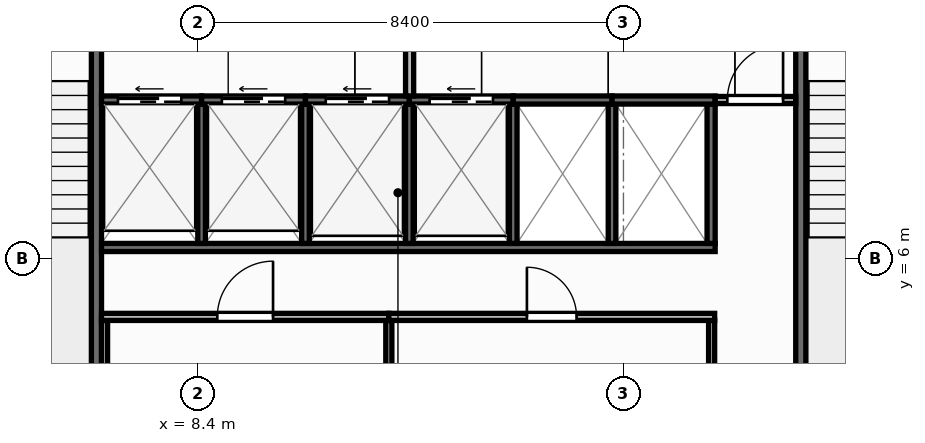
"""IFC4 building model, lengths in metres.
Left out: names, types, materials, properties, quantities, classifications, styles, units other than length and angle.
Written with IfcOpenShell. Run it as: python <this file> out.ifc"""

import sys

from ifc_helpers import new_model, si_unit, direction, frame, frame_2d, origin, place, context, subcontext, project, spatial, rectangle, extrude, element, fill, save


model = new_model("IFC4")
c1 = context("Model", 3, precision=1e-05, world=origin(), true_north=direction((0.0, 1.0)))
c2 = subcontext(c1, "Body", "Model", "MODEL_VIEW")
j1 = project(units=[si_unit("LENGTHUNIT", "METRE"), si_unit("PLANEANGLEUNIT", "RADIAN")], contexts=[c1])
p1 = place(None, origin())
s1 = spatial("IfcSite", under=j1, at=p1, CompositionType="ELEMENT")
p2 = place(p1, origin())
s2 = spatial("IfcBuilding", under=s1, at=p2, CompositionType="ELEMENT")
p3 = place(p2, frame((0.0, 0.0, -4.5)))
s3 = spatial("IfcBuildingStorey", under=s2, at=p3, CompositionType="ELEMENT", Elevation=-4.5)
for number, where, z_axis, x_axis in (
    (1, (6.4, 3.5, 0.0), (0.0, 0.0, 1.0), (0.0, 1.0, 0.0)),
    (2, (20.3, 3.5, 0.0), (0.0, 0.0, 1.0), (0.0, 1.0, 0.0)),
):
    element("IfcWall", number, at=place(p3, frame(where, z_axis=z_axis, x_axis=x_axis)), inside=s3, PredefinedType="SHEAR", context=c2, shape_type="SweptSolid", body=[
        extrude(rectangle(XDim=7.6, YDim=0.2, at=frame_2d((3.8, 0.0))), origin(), (0.0, 0.0, 1.0), 4.25),
    ])
p4 = place(p3, frame((6.5, 6.22, 0.0), z_axis=(0.0, 0.0, 1.0), x_axis=(1.0, 0.0, 0.0)))
e3 = element("IfcWall", 3, at=p4, inside=s3, PredefinedType="SHEAR", context=c2, shape_type="SweptSolid", body=[
    extrude(rectangle(XDim=12.11, YDim=0.16, at=frame_2d((6.055, 0.0))), origin(), (0.0, 0.0, 1.0), 4.25),
])
p5 = place(p3, frame((18.53, 6.3, 0.0), z_axis=(0.0, 0.0, 1.0), x_axis=(0.0, 1.0, 0.0)))
e4 = element("IfcWall", 4, at=p5, inside=s3, PredefinedType="SHEAR", context=c2, shape_type="SweptSolid", body=[
    extrude(rectangle(XDim=2.75, YDim=0.16, at=frame_2d((1.375, 0.0))), origin(), (0.0, 0.0, 1.0), 4.25),
])
for number, where, z_axis, x_axis in (
    (5, (8.475, 6.3, 0.0), (0.0, 0.0, 1.0), (0.0, 1.0, 0.0)),
    (6, (10.525, 6.3, 0.0), (0.0, 0.0, 1.0), (0.0, 1.0, 0.0)),
    (7, (12.575, 6.3, 0.0), (0.0, 0.0, 1.0), (0.0, 1.0, 0.0)),
    (8, (14.625, 6.3, 0.0), (0.0, 0.0, 1.0), (0.0, 1.0, 0.0)),
    (9, (16.575, 6.3, 0.0), (0.0, 0.0, 1.0), (0.0, 1.0, 0.0)),
):
    element("IfcWall", number, at=place(p3, frame(where, z_axis=z_axis, x_axis=x_axis)), inside=s3, PredefinedType="SHEAR", context=c2, shape_type="SweptSolid", body=[
        extrude(rectangle(XDim=2.75, YDim=0.15, at=frame_2d((1.375, 0.0))), origin(), (0.0, 0.0, 1.0), 4.25),
    ])
p6 = place(p3, frame((6.5, 9.13, 0.0), z_axis=(0.0, 0.0, 1.0), x_axis=(1.0, 0.0, 0.0)))
e10 = element("IfcWall", 10, at=p6, inside=s3, PredefinedType="SHEAR", context=c2, shape_type="SweptSolid", body=[
    extrude(rectangle(XDim=1.975, YDim=0.16, at=frame_2d((0.988, 0.0))), origin(), (0.0, 0.0, 1.0), 4.25),
])
p7 = place(p6, frame((0.325, 0.0, 0.0)))
e11 = element("IfcOpeningElement", 11, at=p7, cuts=e10, PredefinedType="OPENING", context=c2, shape_type="SweptSolid", body=[
    extrude(rectangle(XDim=1.25, YDim=2.15, at=frame_2d((0.625, 1.075))), frame((0.0, 0.09, 0.0), z_axis=(0.0, -1.0, 0.0), x_axis=(1.0, 0.0, 0.0)), (0.0, 0.0, 1.0), 0.18),
])
p8 = place(p3, frame((8.475, 9.13, 0.0), z_axis=(0.0, 0.0, 1.0), x_axis=(1.0, 0.0, 0.0)))
e12 = element("IfcWall", 12, at=p8, inside=s3, PredefinedType="SHEAR", context=c2, shape_type="SweptSolid", body=[
    extrude(rectangle(XDim=2.05, YDim=0.16, at=frame_2d((1.025, 0.0))), origin(), (0.0, 0.0, 1.0), 4.25),
])
p9 = place(p8, frame((0.4, 0.0, 0.0)))
e13 = element("IfcOpeningElement", 13, at=p9, cuts=e12, PredefinedType="OPENING", context=c2, shape_type="SweptSolid", body=[
    extrude(rectangle(XDim=1.25, YDim=2.15, at=frame_2d((0.625, 1.075))), frame((0.0, 0.09, 0.0), z_axis=(0.0, -1.0, 0.0), x_axis=(1.0, 0.0, 0.0)), (0.0, 0.0, 1.0), 0.18),
])
p10 = place(p3, frame((10.525, 9.13, 0.0), z_axis=(0.0, 0.0, 1.0), x_axis=(1.0, 0.0, 0.0)))
e14 = element("IfcWall", 14, at=p10, inside=s3, PredefinedType="SHEAR", context=c2, shape_type="SweptSolid", body=[
    extrude(rectangle(XDim=2.05, YDim=0.16, at=frame_2d((1.025, 0.0))), origin(), (0.0, 0.0, 1.0), 4.25),
])
p11 = place(p10, frame((0.4, 0.0, 0.0)))
e15 = element("IfcOpeningElement", 15, at=p11, cuts=e14, PredefinedType="OPENING", context=c2, shape_type="SweptSolid", body=[
    extrude(rectangle(XDim=1.25, YDim=2.15, at=frame_2d((0.625, 1.075))), frame((0.0, 0.09, 0.0), z_axis=(0.0, -1.0, 0.0), x_axis=(1.0, 0.0, 0.0)), (0.0, 0.0, 1.0), 0.18),
])
p12 = place(p3, frame((12.575, 9.13, 0.0), z_axis=(0.0, 0.0, 1.0), x_axis=(1.0, 0.0, 0.0)))
e16 = element("IfcWall", 16, at=p12, inside=s3, PredefinedType="SHEAR", context=c2, shape_type="SweptSolid", body=[
    extrude(rectangle(XDim=2.05, YDim=0.16, at=frame_2d((1.025, 0.0))), origin(), (0.0, 0.0, 1.0), 4.25),
])
p13 = place(p12, frame((0.4, 0.0, 0.0)))
e17 = element("IfcOpeningElement", 17, at=p13, cuts=e16, PredefinedType="OPENING", context=c2, shape_type="SweptSolid", body=[
    extrude(rectangle(XDim=1.25, YDim=2.15, at=frame_2d((0.625, 1.075))), frame((0.0, 0.09, 0.0), z_axis=(0.0, -1.0, 0.0), x_axis=(1.0, 0.0, 0.0)), (0.0, 0.0, 1.0), 0.18),
])
p14 = place(p3, frame((14.625, 9.13, 0.0), z_axis=(0.0, 0.0, 1.0), x_axis=(1.0, 0.0, 0.0)))
e18 = element("IfcWall", 18, at=p14, inside=s3, PredefinedType="SHEAR", context=c2, shape_type="SweptSolid", body=[
    extrude(rectangle(XDim=1.95, YDim=0.16, at=frame_2d((0.975, 0.0))), origin(), (0.0, 0.0, 1.0), 4.25),
])
p15 = place(p3, frame((16.575, 9.13, 0.0), z_axis=(0.0, 0.0, 1.0), x_axis=(1.0, 0.0, 0.0)))
e19 = element("IfcWall", 19, at=p15, inside=s3, PredefinedType="SHEAR", context=c2, shape_type="SweptSolid", body=[
    extrude(rectangle(XDim=2.035, YDim=0.16, at=frame_2d((1.018, 0.0))), origin(), (0.0, 0.0, 1.0), 4.25),
])
for number, where, z_axis, x_axis in (
    (20, (6.56, 3.52, 0.0), (0.0, 0.0, 1.0), (0.0, 1.0, 0.0)),
    (21, (12.17, 3.52, 0.0), (0.0, 0.0, 1.0), (0.0, 1.0, 0.0)),
    (22, (18.54, 3.52, 0.0), (0.0, 0.0, 1.0), (0.0, 1.0, 0.0)),
):
    element("IfcWall", number, at=place(p3, frame(where, z_axis=z_axis, x_axis=x_axis)), inside=s3, PredefinedType="PARTITIONING", context=c2, shape_type="SweptSolid", body=[
        extrude(rectangle(XDim=1.26, YDim=0.12, at=frame_2d((0.63, 0.0))), origin(), (0.0, 0.0, 1.0), 4.25),
    ])
p16 = place(p3, frame((6.5, 4.85, 0.0), z_axis=(0.0, 0.0, 1.0), x_axis=(1.0, 0.0, 0.0)))
e23 = element("IfcWall", 23, at=p16, inside=s3, PredefinedType="PARTITIONING", context=c2, shape_type="SweptSolid", body=[
    extrude(rectangle(XDim=5.67, YDim=0.14, at=frame_2d((2.835, 0.0))), origin(), (0.0, 0.0, 1.0), 4.25),
])
p17 = place(p16, frame((2.285, 0.0, 0.0)))
e24 = element("IfcOpeningElement", 24, at=p17, cuts=e23, PredefinedType="OPENING", context=c2, shape_type="SweptSolid", body=[
    extrude(rectangle(XDim=1.1, YDim=2.1, at=frame_2d((0.55, 1.05))), frame((0.0, 0.08, 0.0), z_axis=(0.0, -1.0, 0.0), x_axis=(1.0, 0.0, 0.0)), (0.0, 0.0, 1.0), 0.16),
])
p18 = place(p3, frame((12.17, 4.85, 0.0), z_axis=(0.0, 0.0, 1.0), x_axis=(1.0, 0.0, 0.0)))
e25 = element("IfcWall", 25, at=p18, inside=s3, PredefinedType="PARTITIONING", context=c2, shape_type="SweptSolid", body=[
    extrude(rectangle(XDim=6.43, YDim=0.14, at=frame_2d((3.215, 0.0))), origin(), (0.0, 0.0, 1.0), 4.25),
])
p19 = place(p18, frame((2.725, 0.0, 0.0)))
e26 = element("IfcOpeningElement", 26, at=p19, cuts=e25, PredefinedType="OPENING", context=c2, shape_type="SweptSolid", body=[
    extrude(rectangle(XDim=0.98, YDim=2.1, at=frame_2d((0.49, 1.05))), frame((0.0, 0.08, 0.0), z_axis=(0.0, -1.0, 0.0), x_axis=(1.0, 0.0, 0.0)), (0.0, 0.0, 1.0), 0.16),
])
p20 = place(p3, frame((18.61, 9.13, 0.0), z_axis=(0.0, 0.0, 1.0), x_axis=(1.0, 0.0, 0.0)))
e27 = element("IfcWall", 27, at=p20, inside=s3, PredefinedType="PARTITIONING", context=c2, shape_type="SweptSolid", body=[
    extrude(rectangle(XDim=1.59, YDim=0.14, at=frame_2d((0.795, 0.0))), origin(), (0.0, 0.0, 1.0), 4.25),
])
p21 = place(p20, frame((0.24, 0.0, 0.0)))
e28 = element("IfcOpeningElement", 28, at=p21, cuts=e27, PredefinedType="OPENING", context=c2, shape_type="SweptSolid", body=[
    extrude(rectangle(XDim=1.1, YDim=2.1, at=frame_2d((0.55, 1.05))), frame((0.0, 0.08, 0.0), z_axis=(0.0, -1.0, 0.0), x_axis=(1.0, 0.0, 0.0)), (0.0, 0.0, 1.0), 0.16),
])
p22 = place(p3, frame((12.58, 9.21, 0.0), z_axis=(0.0, 0.0, 1.0), x_axis=(0.0, 1.0, 0.0)))
e29 = element("IfcWall", 29, at=p22, inside=s3, PredefinedType="PARTITIONING", context=c2, shape_type="SweptSolid", body=[
    extrude(rectangle(XDim=2.79, YDim=0.16, at=frame_2d((1.395, 0.0))), origin(), (0.0, 0.0, 1.0), 4.25),
])
p23 = place(p7, origin())
e30 = element("IfcDoor", 30, at=p23, inside=s3, OperationType="SLIDING_TO_LEFT", PredefinedType="DOOR", context=c2, shape_type="SweptSolid", body=[
    extrude(rectangle(XDim=1.25, YDim=2.15, at=frame_2d((0.625, 1.075))), frame((0.0, 0.025, 0.0), z_axis=(0.0, -1.0, 0.0), x_axis=(1.0, 0.0, 0.0)), (0.0, 0.0, 1.0), 0.05),
])
fill(e11, e30)
p24 = place(p9, origin())
e31 = element("IfcDoor", 31, at=p24, inside=s3, OperationType="SLIDING_TO_LEFT", PredefinedType="DOOR", context=c2, shape_type="SweptSolid", body=[
    extrude(rectangle(XDim=1.25, YDim=2.15, at=frame_2d((0.625, 1.075))), frame((0.0, 0.025, 0.0), z_axis=(0.0, -1.0, 0.0), x_axis=(1.0, 0.0, 0.0)), (0.0, 0.0, 1.0), 0.05),
])
fill(e13, e31)
p25 = place(p11, origin())
e32 = element("IfcDoor", 32, at=p25, inside=s3, OperationType="SLIDING_TO_LEFT", PredefinedType="DOOR", context=c2, shape_type="SweptSolid", body=[
    extrude(rectangle(XDim=1.25, YDim=2.15, at=frame_2d((0.625, 1.075))), frame((0.0, 0.025, 0.0), z_axis=(0.0, -1.0, 0.0), x_axis=(1.0, 0.0, 0.0)), (0.0, 0.0, 1.0), 0.05),
])
fill(e15, e32)
p26 = place(p13, origin())
e33 = element("IfcDoor", 33, at=p26, inside=s3, OperationType="SLIDING_TO_LEFT", PredefinedType="DOOR", context=c2, shape_type="SweptSolid", body=[
    extrude(rectangle(XDim=1.25, YDim=2.15, at=frame_2d((0.625, 1.075))), frame((0.0, 0.025, 0.0), z_axis=(0.0, -1.0, 0.0), x_axis=(1.0, 0.0, 0.0)), (0.0, 0.0, 1.0), 0.05),
])
fill(e17, e33)
p27 = place(p17, origin())
e34 = element("IfcDoor", 34, at=p27, inside=s3, OperationType="SINGLE_SWING_RIGHT", PredefinedType="DOOR", context=c2, shape_type="SweptSolid", body=[
    extrude(rectangle(XDim=1.1, YDim=2.1, at=frame_2d((0.55, 1.05))), frame((0.0, 0.025, 0.0), z_axis=(0.0, -1.0, 0.0), x_axis=(1.0, 0.0, 0.0)), (0.0, 0.0, 1.0), 0.05),
])
fill(e24, e34)
p28 = place(p19, origin())
e35 = element("IfcDoor", 35, at=p28, inside=s3, OperationType="SINGLE_SWING_LEFT", PredefinedType="DOOR", context=c2, shape_type="SweptSolid", body=[
    extrude(rectangle(XDim=0.98, YDim=2.1, at=frame_2d((0.49, 1.05))), frame((0.0, 0.025, 0.0), z_axis=(0.0, -1.0, 0.0), x_axis=(1.0, 0.0, 0.0)), (0.0, 0.0, 1.0), 0.05),
])
fill(e26, e35)
p29 = place(p21, origin())
e36 = element("IfcDoor", 36, at=p29, inside=s3, OperationType="SINGLE_SWING_RIGHT", PredefinedType="DOOR", context=c2, shape_type="SweptSolid", body=[
    extrude(rectangle(XDim=1.1, YDim=2.1, at=frame_2d((0.55, 1.05))), frame((0.0, 0.025, 0.0), z_axis=(0.0, -1.0, 0.0), x_axis=(1.0, 0.0, 0.0)), (0.0, 0.0, 1.0), 0.05),
])
fill(e28, e36)
save(model, sys.argv[1])
